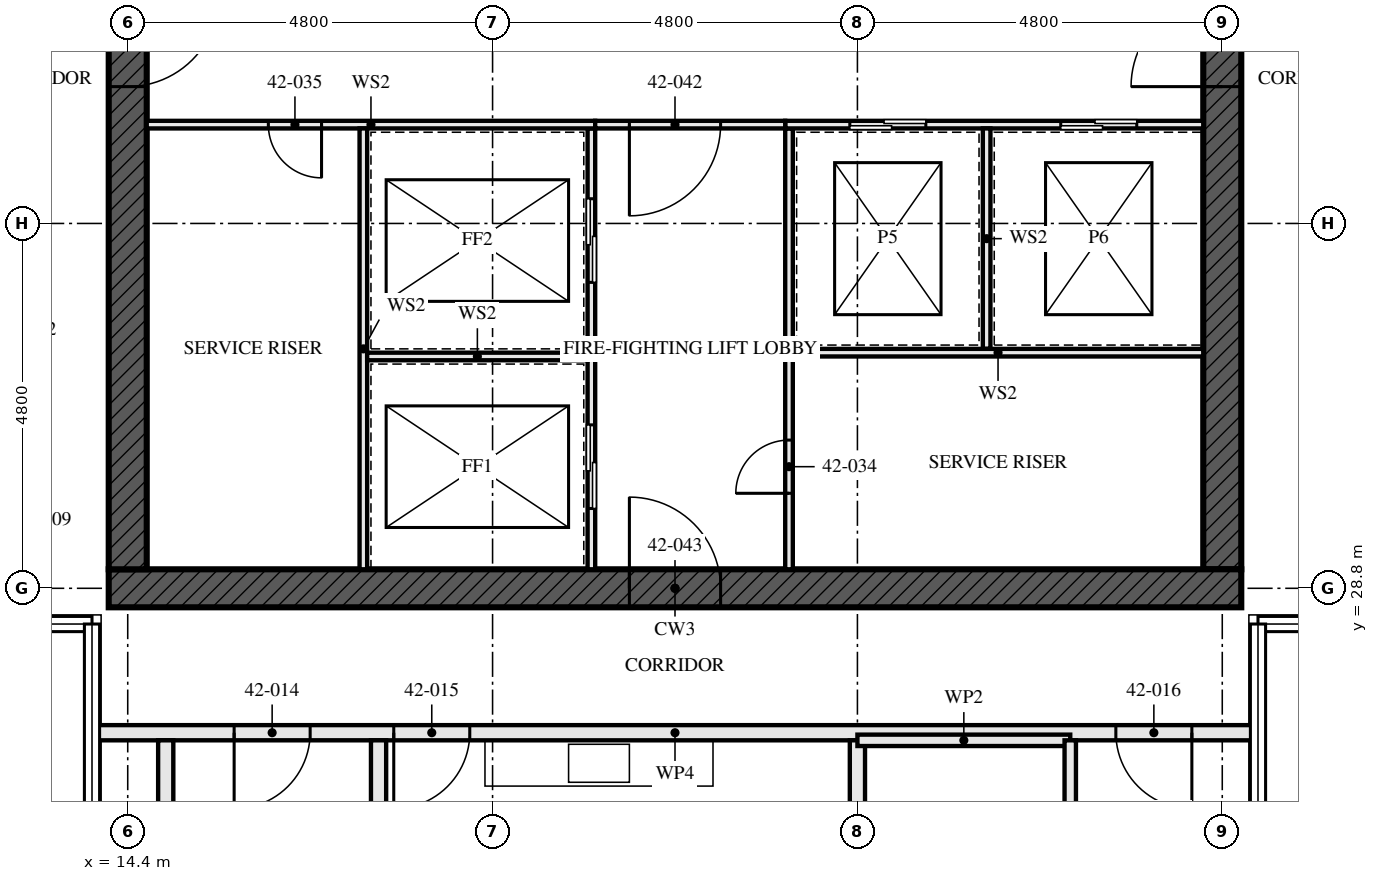
"""IFC4 building model, lengths in metres.
Left out: names, types, materials, properties, quantities, classifications, styles, units other than length and angle.
Written with IfcOpenShell. Run it as: python <this file> out.ifc"""

import sys

from ifc_helpers import new_model, si_unit, direction, frame, frame_2d, origin, place, context, subcontext, project, spatial, rectangle, extrude, element, fill, save


model = new_model("IFC4")
c1 = context("Model", 3, precision=1e-05, world=origin(), true_north=direction((0.0, 1.0)))
c2 = subcontext(c1, "Body", "Model", "MODEL_VIEW")
j1 = project(units=[si_unit("LENGTHUNIT", "METRE"), si_unit("PLANEANGLEUNIT", "RADIAN")], contexts=[c1])
p1 = place(None, origin())
s1 = spatial("IfcSite", under=j1, at=p1, CompositionType="ELEMENT")
p2 = place(p1, origin())
s2 = spatial("IfcBuilding", under=s1, at=p2, CompositionType="ELEMENT")
p3 = place(p2, frame((0.0, 0.0, 155.0)))
s3 = spatial("IfcBuildingStorey", under=s2, at=p3, CompositionType="ELEMENT", Elevation=155.0)
p4 = place(p3, frame((14.15, 28.8, -0.17), z_axis=(0.0, 0.0, 1.0), x_axis=(1.0, 0.0, 0.0)))
e1 = element("IfcWall", 1, at=p4, inside=s3, PredefinedType="SHEAR", context=c2, shape_type="SweptSolid", body=[
    extrude(rectangle(XDim=14.9, YDim=0.5, at=frame_2d((7.45, 0.0))), origin(), (0.0, 0.0, 1.0), 3.5),
])
p5 = place(p4, frame((6.85, 0.0, 0.17)))
e2 = element("IfcOpeningElement", 2, at=p5, cuts=e1, PredefinedType="OPENING", context=c2, shape_type="SweptSolid", body=[
    extrude(rectangle(XDim=1.2, YDim=2.1, at=frame_2d((0.6, 1.05))), frame((0.0, 0.26, 0.0), z_axis=(0.0, -1.0, 0.0), x_axis=(1.0, 0.0, 0.0)), (0.0, 0.0, 1.0), 0.521),
])
p6 = place(p3, frame((14.4, 42.95, -0.17), z_axis=(0.0, 0.0, 1.0), x_axis=(0.0, -1.0, 0.0)))
e3 = element("IfcWall", 3, at=p6, inside=s3, PredefinedType="SHEAR", context=c2, shape_type="SweptSolid", body=[
    extrude(rectangle(XDim=13.9, YDim=0.5, at=frame_2d((6.95, 0.0))), origin(), (0.0, 0.0, 1.0), 3.5),
])
p7 = place(p6, frame((6.35, 0.0, 0.17)))
e4 = element("IfcOpeningElement", 4, at=p7, cuts=e3, PredefinedType="OPENING", context=c2, shape_type="SweptSolid", body=[
    extrude(rectangle(XDim=1.2, YDim=2.1, at=frame_2d((0.6, 1.05))), frame((0.0, 0.26, 0.0), z_axis=(0.0, -1.0, 0.0), x_axis=(1.0, 0.0, 0.0)), (0.0, 0.0, 1.0), 0.521),
])
p8 = place(p3, frame((28.8, 29.05, -0.17), z_axis=(0.0, 0.0, 1.0), x_axis=(0.0, 1.0, 0.0)))
e5 = element("IfcWall", 5, at=p8, inside=s3, PredefinedType="SHEAR", context=c2, shape_type="SweptSolid", body=[
    extrude(rectangle(XDim=13.9, YDim=0.5, at=frame_2d((6.95, 0.0))), origin(), (0.0, 0.0, 1.0), 3.5),
])
p9 = place(p8, frame((6.35, 0.0, 0.17)))
e6 = element("IfcOpeningElement", 6, at=p9, cuts=e5, PredefinedType="OPENING", context=c2, shape_type="SweptSolid", body=[
    extrude(rectangle(XDim=1.2, YDim=2.1, at=frame_2d((0.6, 1.05))), frame((0.0, 0.26, 0.0), z_axis=(0.0, -1.0, 0.0), x_axis=(1.0, 0.0, 0.0)), (0.0, 0.0, 1.0), 0.521),
])
for number, where, z_axis, x_axis in (
    (7, (14.9, 22.1, 0.0), (0.0, 0.0, 1.0), (0.0, 1.0, 0.0)),
    (8, (17.7, 22.1, 0.0), (0.0, 0.0, 1.0), (0.0, 1.0, 0.0)),
):
    element("IfcWall", number, at=place(p3, frame(where, z_axis=z_axis, x_axis=x_axis)), inside=s3, PredefinedType="SOLIDWALL", context=c2, shape_type="SweptSolid", body=[
        extrude(rectangle(XDim=4.7, YDim=0.2, at=frame_2d((2.35, 0.0))), origin(), (0.0, 0.0, 1.0), 2.99),
    ])
p10 = place(p3, frame((24.0, 19.52, 0.0), z_axis=(0.0, 0.0, 1.0), x_axis=(0.0, 1.0, 0.0)))
e9 = element("IfcWall", 9, at=p10, inside=s3, PredefinedType="PARTITIONING", context=c2, shape_type="SweptSolid", body=[
    extrude(rectangle(XDim=7.28, YDim=0.2, at=frame_2d((3.64, 0.0))), origin(), (0.0, 0.0, 1.0), 2.55),
])
p11 = place(p3, frame((26.8, 23.8, 0.0), z_axis=(0.0, 0.0, 1.0), x_axis=(0.0, 1.0, 0.0)))
e10 = element("IfcWall", 10, at=p11, inside=s3, PredefinedType="PARTITIONING", context=c2, shape_type="SweptSolid", body=[
    extrude(rectangle(XDim=3.0, YDim=0.15, at=frame_2d((1.5, 0.0))), origin(), (0.0, 0.0, 1.0), 2.55),
])
p12 = place(p11, frame((1.05, 0.0, 0.0)))
e11 = element("IfcOpeningElement", 11, at=p12, cuts=e10, PredefinedType="OPENING", context=c2, shape_type="SweptSolid", body=[
    extrude(rectangle(XDim=0.9, YDim=2.1, at=frame_2d((0.45, 1.05))), frame((0.0, 0.085, 0.0), z_axis=(0.0, -1.0, 0.0), x_axis=(1.0, 0.0, 0.0)), (0.0, 0.0, 1.0), 0.171),
])
p13 = place(p3, frame((24.0, 26.8, 0.0), z_axis=(0.0, 0.0, 1.0), x_axis=(1.0, 0.0, 0.0)))
e12 = element("IfcWall", 12, at=p13, inside=s3, PredefinedType="PARTITIONING", context=c2, shape_type="SweptSolid", body=[
    extrude(rectangle(XDim=2.8, YDim=0.15, at=frame_2d((1.4, 0.0))), origin(), (0.0, 0.0, 1.0), 3.33),
])
p14 = place(p3, frame((13.95, 26.9, 0.0), z_axis=(0.0, 0.0, 1.0), x_axis=(1.0, 0.0, 0.0)))
e13 = element("IfcWall", 13, at=p14, inside=s3, PredefinedType="PARTITIONING", context=c2, shape_type="SweptSolid", body=[
    extrude(rectangle(XDim=15.3, YDim=0.2, at=frame_2d((7.65, 0.0))), origin(), (0.0, 0.0, 1.0), 2.32),
])
p15 = place(p14, frame((1.85, 0.0, 0.0)))
e14 = element("IfcOpeningElement", 14, at=p15, cuts=e13, PredefinedType="OPENING", context=c2, shape_type="SweptSolid", body=[
    extrude(rectangle(XDim=1.0, YDim=2.1, at=frame_2d((0.5, 1.05))), frame((0.0, 0.111, 0.0), z_axis=(0.0, -1.0, 0.0), x_axis=(1.0, 0.0, 0.0)), (0.0, 0.0, 1.0), 0.221),
])
p16 = place(p14, frame((3.95, 0.0, 0.0)))
e15 = element("IfcOpeningElement", 15, at=p16, cuts=e13, PredefinedType="OPENING", context=c2, shape_type="SweptSolid", body=[
    extrude(rectangle(XDim=1.0, YDim=2.1, at=frame_2d((0.5, 1.05))), frame((0.0, 0.111, 0.0), z_axis=(0.0, -1.0, 0.0), x_axis=(1.0, 0.0, 0.0)), (0.0, 0.0, 1.0), 0.221),
])
p17 = place(p14, frame((13.45, 0.0, 0.0)))
e16 = element("IfcOpeningElement", 16, at=p17, cuts=e13, PredefinedType="OPENING", context=c2, shape_type="SweptSolid", body=[
    extrude(rectangle(XDim=1.0, YDim=2.1, at=frame_2d((0.5, 1.05))), frame((0.0, 0.111, 0.0), z_axis=(0.0, -1.0, 0.0), x_axis=(1.0, 0.0, 0.0)), (0.0, 0.0, 1.0), 0.221),
])
p18 = place(p3, frame((20.5, 29.05, 0.0), z_axis=(0.0, 0.0, 1.0), x_axis=(0.0, 1.0, 0.0)))
e17 = element("IfcWall", 17, at=p18, inside=s3, PredefinedType="SOLIDWALL", context=c2, shape_type="SweptSolid", body=[
    extrude(rectangle(XDim=5.8, YDim=0.1, at=frame_2d((2.9, 0.0))), origin(), (0.0, 0.0, 1.0), 3.33),
])
p19 = place(p18, frame((0.8, 0.0, 0.0)))
e18 = element("IfcOpeningElement", 18, at=p19, cuts=e17, PredefinedType="OPENING", context=c2, shape_type="SweptSolid", body=[
    extrude(rectangle(XDim=1.1, YDim=2.3, at=frame_2d((0.55, 1.15))), frame((0.0, 0.061, 0.0), z_axis=(0.0, -1.0, 0.0), x_axis=(1.0, 0.0, 0.0)), (0.0, 0.0, 1.0), 0.121),
])
p20 = place(p18, frame((3.775, 0.0, 0.0)))
e19 = element("IfcOpeningElement", 19, at=p20, cuts=e17, PredefinedType="OPENING", context=c2, shape_type="SweptSolid", body=[
    extrude(rectangle(XDim=1.1, YDim=2.3, at=frame_2d((0.55, 1.15))), frame((0.0, 0.061, 0.0), z_axis=(0.0, -1.0, 0.0), x_axis=(1.0, 0.0, 0.0)), (0.0, 0.0, 1.0), 0.121),
])
p21 = place(p3, frame((23.1, 29.05, 0.0), z_axis=(0.0, 0.0, 1.0), x_axis=(0.0, 1.0, 0.0)))
e20 = element("IfcWall", 20, at=p21, inside=s3, PredefinedType="SOLIDWALL", context=c2, shape_type="SweptSolid", body=[
    extrude(rectangle(XDim=5.8, YDim=0.1, at=frame_2d((2.9, 0.0))), origin(), (0.0, 0.0, 1.0), 3.33),
])
p22 = place(p21, frame((1.0, 0.0, 0.0)))
e21 = element("IfcOpeningElement", 21, at=p22, cuts=e20, PredefinedType="OPENING", context=c2, shape_type="SweptSolid", body=[
    extrude(rectangle(XDim=0.7, YDim=2.1, at=frame_2d((0.35, 1.05))), frame((0.0, 0.061, 0.0), z_axis=(0.0, -1.0, 0.0), x_axis=(1.0, 0.0, 0.0)), (0.0, 0.0, 1.0), 0.121),
])
p23 = place(p3, frame((14.65, 34.9, 0.0), z_axis=(0.0, 0.0, 1.0), x_axis=(1.0, 0.0, 0.0)))
e22 = element("IfcWall", 22, at=p23, inside=s3, PredefinedType="SOLIDWALL", context=c2, shape_type="SweptSolid", body=[
    extrude(rectangle(XDim=5.9, YDim=0.1, at=frame_2d((2.95, 0.0))), origin(), (0.0, 0.0, 1.0), 3.33),
])
p24 = place(p23, frame((1.6, 0.0, 0.0)))
e23 = element("IfcOpeningElement", 23, at=p24, cuts=e22, PredefinedType="OPENING", context=c2, shape_type="SweptSolid", body=[
    extrude(rectangle(XDim=0.7, YDim=2.1, at=frame_2d((0.35, 1.05))), frame((0.0, 0.061, 0.0), z_axis=(0.0, -1.0, 0.0), x_axis=(1.0, 0.0, 0.0)), (0.0, 0.0, 1.0), 0.121),
])
p25 = place(p3, frame((23.05, 34.9, 0.0), z_axis=(0.0, 0.0, 1.0), x_axis=(1.0, 0.0, 0.0)))
e24 = element("IfcWall", 24, at=p25, inside=s3, PredefinedType="SOLIDWALL", context=c2, shape_type="SweptSolid", body=[
    extrude(rectangle(XDim=5.5, YDim=0.1, at=frame_2d((2.75, 0.0))), origin(), (0.0, 0.0, 1.0), 3.33),
])
p26 = place(p25, frame((0.85, 0.0, 0.0)))
e25 = element("IfcOpeningElement", 25, at=p26, cuts=e24, PredefinedType="OPENING", context=c2, shape_type="SweptSolid", body=[
    extrude(rectangle(XDim=1.0, YDim=2.1, at=frame_2d((0.5, 1.05))), frame((0.0, 0.061, 0.0), z_axis=(0.0, -1.0, 0.0), x_axis=(1.0, 0.0, 0.0)), (0.0, 0.0, 1.0), 0.121),
])
p27 = place(p25, frame((3.625, 0.0, 0.0)))
e26 = element("IfcOpeningElement", 26, at=p27, cuts=e24, PredefinedType="OPENING", context=c2, shape_type="SweptSolid", body=[
    extrude(rectangle(XDim=1.0, YDim=2.1, at=frame_2d((0.5, 1.05))), frame((0.0, 0.061, 0.0), z_axis=(0.0, -1.0, 0.0), x_axis=(1.0, 0.0, 0.0)), (0.0, 0.0, 1.0), 0.121),
])
p28 = place(p3, frame((20.55, 34.9, 0.0), z_axis=(0.0, 0.0, 1.0), x_axis=(1.0, 0.0, 0.0)))
e27 = element("IfcWall", 27, at=p28, inside=s3, PredefinedType="SOLIDWALL", context=c2, shape_type="SweptSolid", body=[
    extrude(rectangle(XDim=2.5, YDim=0.1, at=frame_2d((1.25, 0.0))), origin(), (0.0, 0.0, 1.0), 3.33),
])
p29 = place(p28, frame((0.45, 0.0, 0.0)))
e28 = element("IfcOpeningElement", 28, at=p29, cuts=e27, PredefinedType="OPENING", context=c2, shape_type="SweptSolid", body=[
    extrude(rectangle(XDim=1.2, YDim=2.1, at=frame_2d((0.6, 1.05))), frame((0.0, 0.061, 0.0), z_axis=(0.0, -1.0, 0.0), x_axis=(1.0, 0.0, 0.0)), (0.0, 0.0, 1.0), 0.121),
])
p30 = place(p3, frame((17.5, 29.05, 0.0), z_axis=(0.0, 0.0, 1.0), x_axis=(0.0, 1.0, 0.0)))
e29 = element("IfcWall", 29, at=p30, inside=s3, PredefinedType="SOLIDWALL", context=c2, shape_type="SweptSolid", body=[
    extrude(rectangle(XDim=5.8, YDim=0.1, at=frame_2d((2.9, 0.0))), origin(), (0.0, 0.0, 1.0), 3.33),
])
p31 = place(p3, frame((17.55, 31.85, 0.0), z_axis=(0.0, 0.0, 1.0), x_axis=(1.0, 0.0, 0.0)))
e30 = element("IfcWall", 30, at=p31, inside=s3, PredefinedType="SOLIDWALL", context=c2, shape_type="SweptSolid", body=[
    extrude(rectangle(XDim=2.9, YDim=0.1, at=frame_2d((1.45, 0.0))), origin(), (0.0, 0.0, 1.0), 3.33),
])
p32 = place(p3, frame((25.7, 31.95, 0.0), z_axis=(0.0, 0.0, 1.0), x_axis=(0.0, 1.0, 0.0)))
e31 = element("IfcWall", 31, at=p32, inside=s3, PredefinedType="SOLIDWALL", context=c2, shape_type="SweptSolid", body=[
    extrude(rectangle(XDim=2.9, YDim=0.1, at=frame_2d((1.45, 0.0))), origin(), (0.0, 0.0, 1.0), 3.33),
])
p33 = place(p3, frame((23.15, 31.9, 0.0), z_axis=(0.0, 0.0, 1.0), x_axis=(1.0, 0.0, 0.0)))
e32 = element("IfcWall", 32, at=p33, inside=s3, PredefinedType="SOLIDWALL", context=c2, shape_type="SweptSolid", body=[
    extrude(rectangle(XDim=5.4, YDim=0.1, at=frame_2d((2.7, 0.0))), origin(), (0.0, 0.0, 1.0), 3.33),
])
p34 = place(p15, frame((1.0, 0.0, 0.0), z_axis=(0.0, 0.0, 1.0), x_axis=(-1.0, 0.0, 0.0)))
e33 = element("IfcDoor", 33, at=p34, inside=s3, OperationType="SINGLE_SWING_LEFT", PredefinedType="DOOR", context=c2, shape_type="SweptSolid", body=[
    extrude(rectangle(XDim=1.0, YDim=2.1, at=frame_2d((0.5, 1.05))), frame((0.0, 0.032, 0.0), z_axis=(0.0, -1.0, 0.0), x_axis=(1.0, 0.0, 0.0)), (0.0, 0.0, 1.0), 0.064),
])
fill(e14, e33)
p35 = place(p16, frame((1.0, 0.0, 0.0), z_axis=(0.0, 0.0, 1.0), x_axis=(-1.0, 0.0, 0.0)))
e34 = element("IfcDoor", 34, at=p35, inside=s3, OperationType="SINGLE_SWING_LEFT", PredefinedType="DOOR", context=c2, shape_type="SweptSolid", body=[
    extrude(rectangle(XDim=1.0, YDim=2.1, at=frame_2d((0.5, 1.05))), frame((0.0, 0.027, 0.0), z_axis=(0.0, -1.0, 0.0), x_axis=(1.0, 0.0, 0.0)), (0.0, 0.0, 1.0), 0.054),
])
fill(e15, e34)
p36 = place(p17, frame((1.0, 0.0, 0.0), z_axis=(0.0, 0.0, 1.0), x_axis=(-1.0, 0.0, 0.0)))
e35 = element("IfcDoor", 35, at=p36, inside=s3, OperationType="SINGLE_SWING_RIGHT", PredefinedType="DOOR", context=c2, shape_type="SweptSolid", body=[
    extrude(rectangle(XDim=1.0, YDim=2.1, at=frame_2d((0.5, 1.05))), frame((0.0, 0.027, 0.0), z_axis=(0.0, -1.0, 0.0), x_axis=(1.0, 0.0, 0.0)), (0.0, 0.0, 1.0), 0.054),
])
fill(e16, e35)
p37 = place(p19, origin())
e36 = element("IfcDoor", 36, at=p37, inside=s3, OperationType="SLIDING_TO_LEFT", PredefinedType="DOOR", context=c2, shape_type="SweptSolid", body=[
    extrude(rectangle(XDim=1.1, YDim=2.3, at=frame_2d((0.55, 1.15))), frame((0.0, 0.05, 0.0), z_axis=(0.0, -1.0, 0.0), x_axis=(1.0, 0.0, 0.0)), (0.0, 0.0, 1.0), 0.1),
])
fill(e18, e36)
p38 = place(p20, origin())
e37 = element("IfcDoor", 37, at=p38, inside=s3, OperationType="SLIDING_TO_LEFT", PredefinedType="DOOR", context=c2, shape_type="SweptSolid", body=[
    extrude(rectangle(XDim=1.1, YDim=2.3, at=frame_2d((0.55, 1.15))), frame((0.0, 0.05, 0.0), z_axis=(0.0, -1.0, 0.0), x_axis=(1.0, 0.0, 0.0)), (0.0, 0.0, 1.0), 0.1),
])
fill(e19, e37)
p39 = place(p22, origin())
e38 = element("IfcDoor", 38, at=p39, inside=s3, OperationType="SINGLE_SWING_RIGHT", PredefinedType="DOOR", context=c2, shape_type="SweptSolid", body=[
    extrude(rectangle(XDim=0.7, YDim=2.1, at=frame_2d((0.35, 1.05))), frame((0.0, 0.027, 0.0), z_axis=(0.0, -1.0, 0.0), x_axis=(1.0, 0.0, 0.0)), (0.0, 0.0, 1.0), 0.054),
])
fill(e21, e38)
p40 = place(p24, frame((0.7, 0.0, 0.0), z_axis=(0.0, 0.0, 1.0), x_axis=(-1.0, 0.0, 0.0)))
e39 = element("IfcDoor", 39, at=p40, inside=s3, OperationType="SINGLE_SWING_RIGHT", PredefinedType="DOOR", context=c2, shape_type="SweptSolid", body=[
    extrude(rectangle(XDim=0.7, YDim=2.1, at=frame_2d((0.35, 1.05))), frame((0.0, 0.027, 0.0), z_axis=(0.0, -1.0, 0.0), x_axis=(1.0, 0.0, 0.0)), (0.0, 0.0, 1.0), 0.054),
])
fill(e23, e39)
p41 = place(p26, origin())
e40 = element("IfcDoor", 40, at=p41, inside=s3, OperationType="SLIDING_TO_LEFT", PredefinedType="DOOR", context=c2, shape_type="SweptSolid", body=[
    extrude(rectangle(XDim=1.0, YDim=2.1, at=frame_2d((0.5, 1.05))), frame((0.0, 0.05, 0.0), z_axis=(0.0, -1.0, 0.0), x_axis=(1.0, 0.0, 0.0)), (0.0, 0.0, 1.0), 0.1),
])
fill(e25, e40)
p42 = place(p27, origin())
e41 = element("IfcDoor", 41, at=p42, inside=s3, OperationType="SLIDING_TO_LEFT", PredefinedType="DOOR", context=c2, shape_type="SweptSolid", body=[
    extrude(rectangle(XDim=1.0, YDim=2.1, at=frame_2d((0.5, 1.05))), frame((0.0, 0.05, 0.0), z_axis=(0.0, -1.0, 0.0), x_axis=(1.0, 0.0, 0.0)), (0.0, 0.0, 1.0), 0.1),
])
fill(e26, e41)
p43 = place(p29, frame((1.2, 0.0, 0.0), z_axis=(0.0, 0.0, 1.0), x_axis=(-1.0, 0.0, 0.0)))
e42 = element("IfcDoor", 42, at=p43, inside=s3, OperationType="SINGLE_SWING_LEFT", PredefinedType="DOOR", context=c2, shape_type="SweptSolid", body=[
    extrude(rectangle(XDim=1.2, YDim=2.1, at=frame_2d((0.6, 1.05))), frame((0.0, 0.027, 0.0), z_axis=(0.0, -1.0, 0.0), x_axis=(1.0, 0.0, 0.0)), (0.0, 0.0, 1.0), 0.054),
])
fill(e28, e42)
p44 = place(p5, origin())
e43 = element("IfcDoor", 43, at=p44, inside=s3, OperationType="SINGLE_SWING_LEFT", PredefinedType="DOOR", context=c2, shape_type="SweptSolid", body=[
    extrude(rectangle(XDim=1.2, YDim=2.1, at=frame_2d((0.6, 1.05))), frame((0.0, 0.027, 0.0), z_axis=(0.0, -1.0, 0.0), x_axis=(1.0, 0.0, 0.0)), (0.0, 0.0, 1.0), 0.054),
])
fill(e2, e43)
p45 = place(p7, origin())
e44 = element("IfcDoor", 44, at=p45, inside=s3, OperationType="SINGLE_SWING_LEFT", PredefinedType="DOOR", context=c2, shape_type="SweptSolid", body=[
    extrude(rectangle(XDim=1.2, YDim=2.1, at=frame_2d((0.6, 1.05))), frame((0.0, 0.027, 0.0), z_axis=(0.0, -1.0, 0.0), x_axis=(1.0, 0.0, 0.0)), (0.0, 0.0, 1.0), 0.054),
])
fill(e4, e44)
p46 = place(p9, origin())
e45 = element("IfcDoor", 45, at=p46, inside=s3, OperationType="SINGLE_SWING_LEFT", PredefinedType="DOOR", context=c2, shape_type="SweptSolid", body=[
    extrude(rectangle(XDim=1.2, YDim=2.1, at=frame_2d((0.6, 1.05))), frame((0.0, 0.027, 0.0), z_axis=(0.0, -1.0, 0.0), x_axis=(1.0, 0.0, 0.0)), (0.0, 0.0, 1.0), 0.054),
])
fill(e6, e45)
save(model, sys.argv[1])
